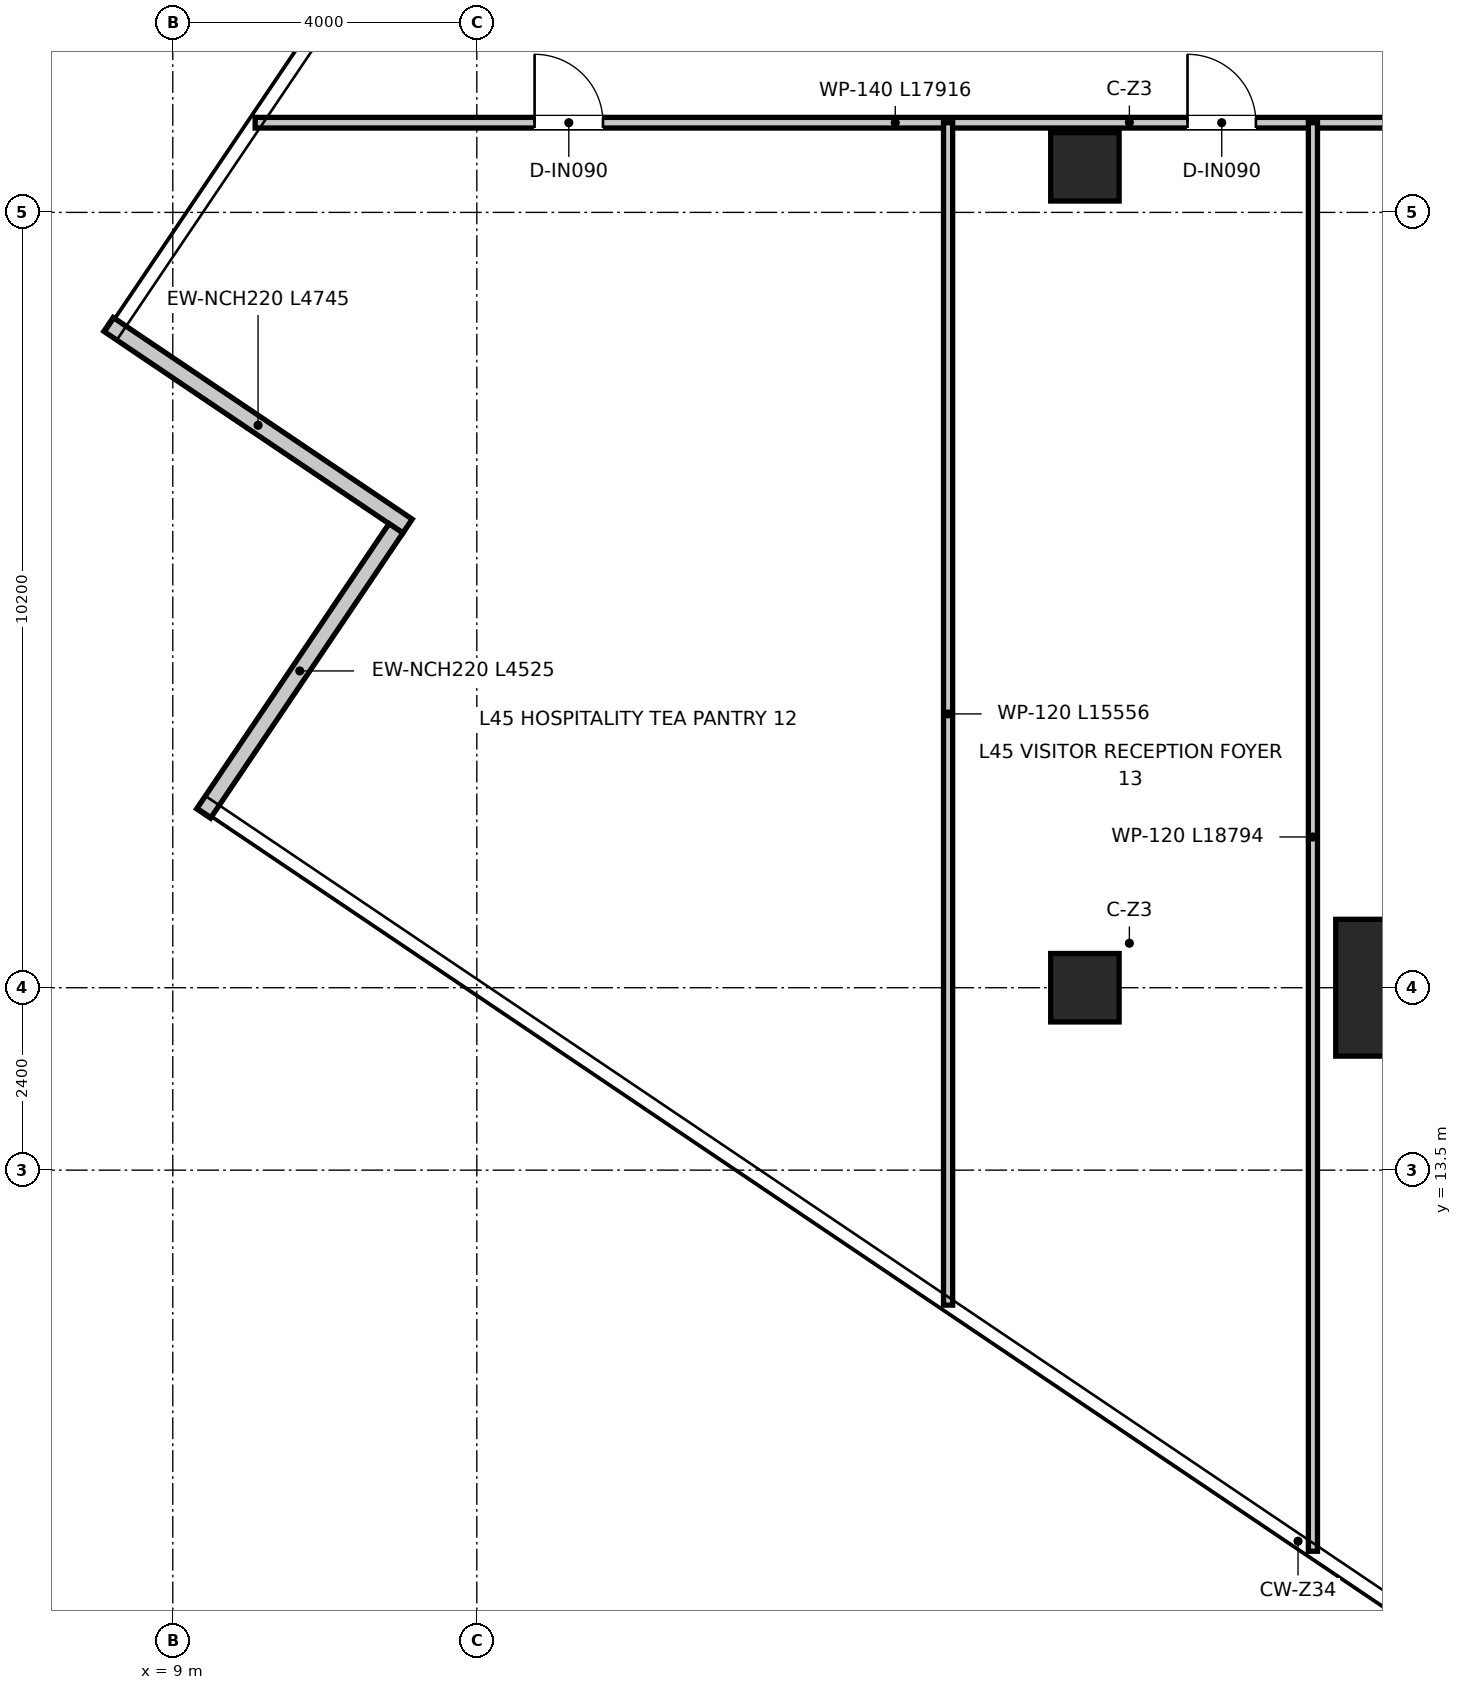
"""IFC4 building model, lengths in metres.
Left out: names, types, materials, properties, quantities, classifications, styles, units other than length and angle.
Written with IfcOpenShell. Run it as: python <this file> out.ifc"""

import sys

from ifc_helpers import new_model, si_unit, direction, frame, frame_2d, origin, origin_2d, place, context, subcontext, project, spatial, rectangle, extrude, source, transform, mapped, element, fill, save


model = new_model("IFC4")
c1 = context("Model", 3, precision=1e-05, world=origin(), true_north=direction((0.0, 1.0)))
c2 = subcontext(c1, "Body", "Model", "MODEL_VIEW")
j1 = project(units=[si_unit("LENGTHUNIT", "METRE"), si_unit("PLANEANGLEUNIT", "RADIAN")], contexts=[c1])
p1 = place(None, origin())
s1 = spatial("IfcSite", under=j1, at=p1, CompositionType="ELEMENT")
p2 = place(p1, origin())
s2 = spatial("IfcBuilding", under=s1, at=p2, CompositionType="ELEMENT")
p3 = place(p2, frame((0.0, 0.0, 185.7)))
s3 = spatial("IfcBuildingStorey", under=s2, at=p3, CompositionType="ELEMENT", Elevation=185.7)
m1 = source(origin(), c2, "Body", "SweptSolid", [
    extrude(rectangle(XDim=1.8, YDim=1.8, at=origin_2d()), origin(), (0.0, 0.0, 1.0), 3.95),
])
p4 = place(p3, frame((25.2, 15.9, 0.0), z_axis=(0.0, 0.0, 1.0), x_axis=(1.0, 0.0, 0.0)))
e1 = element("IfcColumn", 1, at=p4, inside=s3, PredefinedType="USERDEFINED", context=c2, shape_type="MappedRepresentation", body=[
    mapped(m1, transform((0.0, 0.0, 0.0), x_axis=(1.0, 0.0, 0.0), y_axis=(0.0, 1.0, 0.0), z_axis=(0.0, 0.0, 1.0), scale=1.0)),
])
m2 = source(origin(), c2, "Body", "SweptSolid", [
    extrude(rectangle(XDim=0.9, YDim=0.9, at=origin_2d()), origin(), (0.0, 0.0, 1.0), 3.95),
])
for number, where, z_axis, x_axis in (
    (2, (21.0, 15.9, 0.0), (0.0, 0.0, 1.0), (1.0, 0.0, 0.0)),
    (3, (21.0, 26.7, 0.0), (0.0, 0.0, 1.0), (1.0, 0.0, 0.0)),
):
    element("IfcColumn", number, at=place(p3, frame(where, z_axis=z_axis, x_axis=x_axis)), inside=s3, PredefinedType="COLUMN", context=c2, shape_type="MappedRepresentation", body=[
        mapped(m2, transform((0.0, 0.0, 0.0), x_axis=(1.0, 0.0, 0.0), y_axis=(0.0, 1.0, 0.0), z_axis=(0.0, 0.0, 1.0), scale=1.0)),
    ])
p5 = place(p3, frame((8.155, 24.626, 0.0), z_axis=(0.0, 0.0, 1.0), x_axis=(0.829029968461, -0.559204176839, 0.0)))
e4 = element("IfcWall", 4, at=p5, inside=s3, PredefinedType="ELEMENTEDWALL", context=c2, shape_type="SweptSolid", body=[
    extrude(rectangle(XDim=4.745, YDim=0.22, at=frame_2d((2.373, 0.0))), origin(), (0.0, 0.0, 1.0), 3.67),
])
p6 = place(p3, frame((11.936, 21.943, 0.0), z_axis=(0.0, 0.0, 1.0), x_axis=(-0.559236535969, -0.829008140393, 0.0)))
e5 = element("IfcWall", 5, at=p6, inside=s3, PredefinedType="ELEMENTEDWALL", context=c2, shape_type="SweptSolid", body=[
    extrude(rectangle(XDim=4.525, YDim=0.22, at=frame_2d((2.262, 0.0))), origin(), (0.0, 0.0, 1.0), 3.67),
])
p7 = place(p3, frame((10.083, 27.28, 0.0), z_axis=(0.0, 0.0, 1.0), x_axis=(1.0, 0.0, 0.0)))
e6 = element("IfcWall", 6, at=p7, inside=s3, PredefinedType="PARTITIONING", context=c2, shape_type="SweptSolid", body=[
    extrude(rectangle(XDim=17.917, YDim=0.14, at=frame_2d((8.958, 0.0))), origin(), (0.0, 0.0, 1.0), 3.03),
])
p8 = place(p7, frame((3.677, 0.0, 0.0)))
e7 = element("IfcOpeningElement", 7, at=p8, cuts=e6, PredefinedType="OPENING", context=c2, shape_type="SweptSolid", body=[
    extrude(rectangle(XDim=0.9, YDim=2.1, at=frame_2d((0.45, 1.05))), frame((0.0, 0.08, 0.0), z_axis=(0.0, -1.0, 0.0), x_axis=(1.0, 0.0, 0.0)), (0.0, 0.0, 1.0), 0.16),
])
p9 = place(p7, frame((12.266, 0.0, 0.0)))
e8 = element("IfcOpeningElement", 8, at=p9, cuts=e6, PredefinedType="OPENING", context=c2, shape_type="SweptSolid", body=[
    extrude(rectangle(XDim=0.9, YDim=2.1, at=frame_2d((0.45, 1.05))), frame((0.0, 0.08, 0.0), z_axis=(0.0, -1.0, 0.0), x_axis=(1.0, 0.0, 0.0)), (0.0, 0.0, 1.0), 0.16),
])
p10 = place(p7, frame((15.167, 0.0, 0.0)))
e9 = element("IfcOpeningElement", 9, at=p10, cuts=e6, PredefinedType="OPENING", context=c2, shape_type="SweptSolid", body=[
    extrude(rectangle(XDim=0.9, YDim=2.1, at=frame_2d((0.45, 1.05))), frame((0.0, 0.08, 0.0), z_axis=(0.0, -1.0, 0.0), x_axis=(1.0, 0.0, 0.0)), (0.0, 0.0, 1.0), 0.16),
])
p11 = place(p3, frame((19.2, 11.724, 0.0), z_axis=(0.0, 0.0, 1.0), x_axis=(0.0, 1.0, 0.0)))
e10 = element("IfcWall", 10, at=p11, inside=s3, PredefinedType="PARTITIONING", context=c2, shape_type="SweptSolid", body=[
    extrude(rectangle(XDim=15.556, YDim=0.12, at=frame_2d((7.778, 0.0))), origin(), (0.0, 0.0, 1.0), 3.67),
])
p12 = place(p3, frame((24.0, 8.487, 0.0), z_axis=(0.0, 0.0, 1.0), x_axis=(0.0, 1.0, 0.0)))
e11 = element("IfcWall", 11, at=p12, inside=s3, PredefinedType="PARTITIONING", context=c2, shape_type="SweptSolid", body=[
    extrude(rectangle(XDim=18.793, YDim=0.12, at=frame_2d((9.397, 0.0))), origin(), (0.0, 0.0, 1.0), 3.08),
])
p13 = place(p8, origin())
e12 = element("IfcDoor", 12, at=p13, inside=s3, OperationType="SINGLE_SWING_LEFT", PredefinedType="DOOR", context=c2, shape_type="SweptSolid", body=[
    extrude(rectangle(XDim=0.9, YDim=2.1, at=frame_2d((0.45, 1.05))), frame((0.0, 0.025, 0.0), z_axis=(0.0, -1.0, 0.0), x_axis=(1.0, 0.0, 0.0)), (0.0, 0.0, 1.0), 0.05),
])
fill(e7, e12)
p14 = place(p9, origin())
e13 = element("IfcDoor", 13, at=p14, inside=s3, OperationType="SINGLE_SWING_LEFT", PredefinedType="DOOR", context=c2, shape_type="SweptSolid", body=[
    extrude(rectangle(XDim=0.9, YDim=2.1, at=frame_2d((0.45, 1.05))), frame((0.0, 0.025, 0.0), z_axis=(0.0, -1.0, 0.0), x_axis=(1.0, 0.0, 0.0)), (0.0, 0.0, 1.0), 0.05),
])
fill(e8, e13)
save(model, sys.argv[1])
